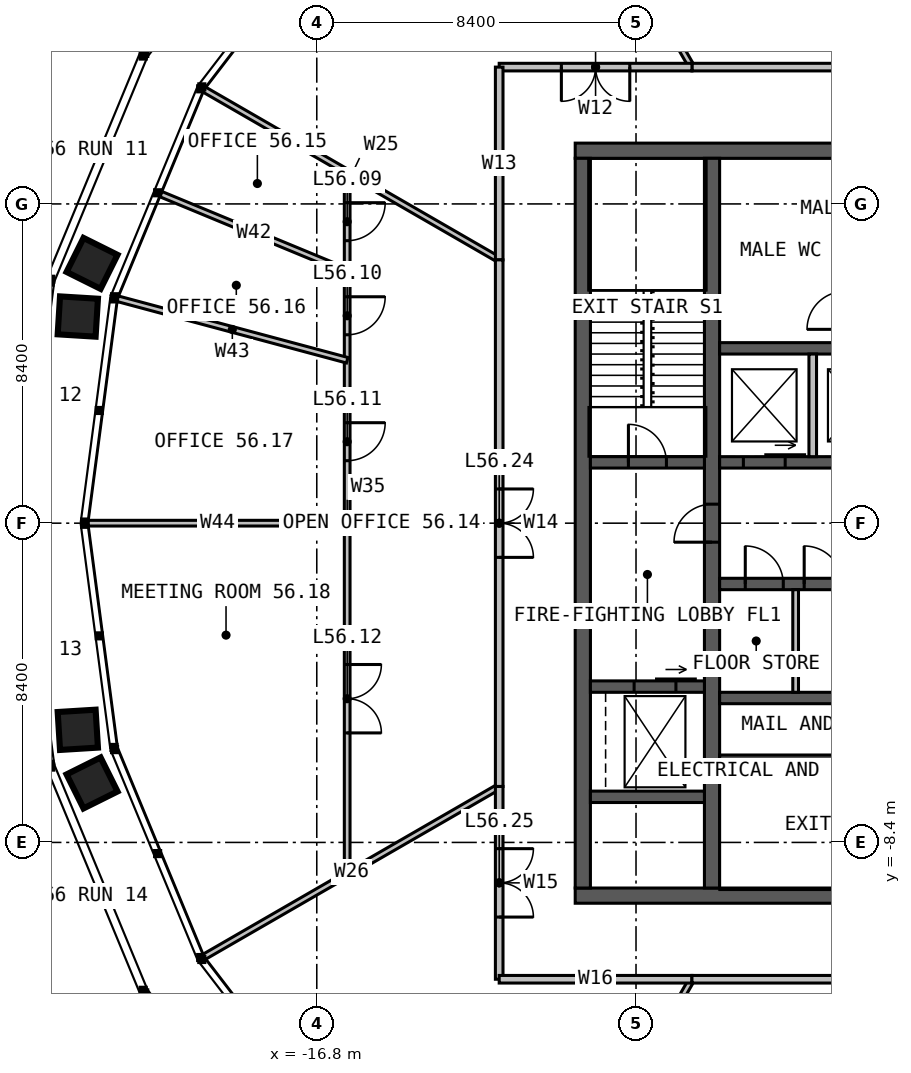
"""IFC4 building model, lengths in metres.
Left out: names, types, materials, properties, quantities, classifications, styles, units other than length and angle.
Written with IfcOpenShell. Run it as: python <this file> out.ifc"""

import sys

from ifc_helpers import new_model, si_unit, direction, frame, frame_2d, origin, place, context, subcontext, project, spatial, rectangle, extrude, element, fill, save


model = new_model("IFC4")
c1 = context("Model", 3, precision=1e-05, world=origin(), true_north=direction((0.0, 1.0)))
c2 = subcontext(c1, "Body", "Model", "MODEL_VIEW")
j1 = project(units=[si_unit("LENGTHUNIT", "METRE"), si_unit("PLANEANGLEUNIT", "RADIAN")], contexts=[c1])
p1 = place(None, origin())
s1 = spatial("IfcSite", under=j1, at=p1, CompositionType="ELEMENT")
p2 = place(p1, origin())
s2 = spatial("IfcBuilding", under=s1, at=p2, CompositionType="ELEMENT")
p3 = place(p2, frame((0.0, 0.0, 232.0)))
s3 = spatial("IfcBuildingStorey", under=s2, at=p3, CompositionType="ELEMENT", Elevation=232.0)
p4 = place(p3, frame((-10.0, 9.8, 0.0), z_axis=(0.0, 0.0, 1.0), x_axis=(1.0, 0.0, 0.0)))
e1 = element("IfcWall", 1, at=p4, inside=s3, PredefinedType="SOLIDWALL", context=c2, shape_type="SweptSolid", body=[
    extrude(rectangle(XDim=20.0, YDim=0.4, at=frame_2d((10.0, 0.0))), origin(), (0.0, 0.0, 1.0), 4.0),
])
p5 = place(p4, frame((9.4, 0.0, 0.0)))
e2 = element("IfcOpeningElement", 2, at=p5, cuts=e1, PredefinedType="OPENING", context=c2, shape_type="SweptSolid", body=[
    extrude(rectangle(XDim=1.2, YDim=2.2, at=frame_2d((0.6, 1.1))), frame((0.0, 0.21, 0.0), z_axis=(0.0, -1.0, 0.0), x_axis=(1.0, 0.0, 0.0)), (0.0, 0.0, 1.0), 0.42),
])
p6 = place(p3, frame((10.0, -9.8, 0.0), z_axis=(0.0, 0.0, 1.0), x_axis=(-1.0, 0.0, 0.0)))
e3 = element("IfcWall", 3, at=p6, inside=s3, PredefinedType="SOLIDWALL", context=c2, shape_type="SweptSolid", body=[
    extrude(rectangle(XDim=20.0, YDim=0.4, at=frame_2d((10.0, 0.0))), origin(), (0.0, 0.0, 1.0), 4.0),
])
p7 = place(p6, frame((6.875, 0.0, 0.0)))
e4 = element("IfcOpeningElement", 4, at=p7, cuts=e3, PredefinedType="OPENING", context=c2, shape_type="SweptSolid", body=[
    extrude(rectangle(XDim=1.2, YDim=2.2, at=frame_2d((0.6, 1.1))), frame((0.0, 0.21, 0.0), z_axis=(0.0, -1.0, 0.0), x_axis=(1.0, 0.0, 0.0)), (0.0, 0.0, 1.0), 0.42),
])
p8 = place(p3, frame((-9.8, 9.6, 0.0), z_axis=(0.0, 0.0, 1.0), x_axis=(0.0, -1.0, 0.0)))
e5 = element("IfcWall", 5, at=p8, inside=s3, PredefinedType="SOLIDWALL", context=c2, shape_type="SweptSolid", body=[
    extrude(rectangle(XDim=19.2, YDim=0.4, at=frame_2d((9.6, 0.0))), origin(), (0.0, 0.0, 1.0), 4.0),
])
p9 = place(p3, frame((-6.4, -9.6, 0.0), z_axis=(0.0, 0.0, 1.0), x_axis=(0.0, 1.0, 0.0)))
e6 = element("IfcWall", 6, at=p9, inside=s3, PredefinedType="SOLIDWALL", context=c2, shape_type="SweptSolid", body=[
    extrude(rectangle(XDim=19.2, YDim=0.4, at=frame_2d((9.6, 0.0))), origin(), (0.0, 0.0, 1.0), 4.0),
])
p10 = place(p9, frame((9.1, 0.0, 0.0)))
e7 = element("IfcOpeningElement", 7, at=p10, cuts=e6, PredefinedType="OPENING", context=c2, shape_type="SweptSolid", body=[
    extrude(rectangle(XDim=1.0, YDim=2.2, at=frame_2d((0.5, 1.1))), frame((0.0, 0.21, 0.0), z_axis=(0.0, -1.0, 0.0), x_axis=(1.0, 0.0, 0.0)), (0.0, 0.0, 1.0), 0.42),
])
p11 = place(p3, frame((-6.2, 1.6, 0.0), z_axis=(0.0, 0.0, 1.0), x_axis=(1.0, 0.0, 0.0)))
e8 = element("IfcWall", 8, at=p11, inside=s3, PredefinedType="SOLIDWALL", context=c2, shape_type="SweptSolid", body=[
    extrude(rectangle(XDim=4.85, YDim=0.3, at=frame_2d((2.425, 0.0))), origin(), (0.0, 0.0, 1.0), 4.0),
])
p12 = place(p11, frame((0.625, 0.0, 0.0)))
e9 = element("IfcOpeningElement", 9, at=p12, cuts=e8, PredefinedType="OPENING", context=c2, shape_type="SweptSolid", body=[
    extrude(rectangle(XDim=1.1, YDim=2.2, at=frame_2d((0.55, 1.1))), frame((0.0, 0.16, 0.0), z_axis=(0.0, -1.0, 0.0), x_axis=(1.0, 0.0, 0.0)), (0.0, 0.0, 1.0), 0.32),
])
p13 = place(p11, frame((3.15, 0.0, 0.0)))
e10 = element("IfcOpeningElement", 10, at=p13, cuts=e8, PredefinedType="OPENING", context=c2, shape_type="SweptSolid", body=[
    extrude(rectangle(XDim=1.1, YDim=2.2, at=frame_2d((0.55, 1.1))), frame((0.0, 0.16, 0.0), z_axis=(0.0, -1.0, 0.0), x_axis=(1.0, 0.0, 0.0)), (0.0, 0.0, 1.0), 0.32),
])
p14 = place(p3, frame((-6.2, 4.6, 0.0), z_axis=(0.0, 0.0, 1.0), x_axis=(1.0, 0.0, 0.0)))
e11 = element("IfcWall", 11, at=p14, inside=s3, PredefinedType="SOLIDWALL", context=c2, shape_type="SweptSolid", body=[
    extrude(rectangle(XDim=4.85, YDim=0.3, at=frame_2d((2.425, 0.0))), origin(), (0.0, 0.0, 1.0), 4.0),
])
p15 = place(p3, frame((-6.2, -1.6, 0.0), z_axis=(0.0, 0.0, 1.0), x_axis=(1.0, 0.0, 0.0)))
e12 = element("IfcWall", 12, at=p15, inside=s3, PredefinedType="SOLIDWALL", context=c2, shape_type="SweptSolid", body=[
    extrude(rectangle(XDim=7.4, YDim=0.3, at=frame_2d((3.7, 0.0))), origin(), (0.0, 0.0, 1.0), 4.0),
])
p16 = place(p15, frame((0.675, 0.0, 0.0)))
e13 = element("IfcOpeningElement", 13, at=p16, cuts=e12, PredefinedType="OPENING", context=c2, shape_type="SweptSolid", body=[
    extrude(rectangle(XDim=1.0, YDim=2.2, at=frame_2d((0.5, 1.1))), frame((0.0, 0.16, 0.0), z_axis=(0.0, -1.0, 0.0), x_axis=(1.0, 0.0, 0.0)), (0.0, 0.0, 1.0), 0.32),
])
p17 = place(p15, frame((2.225, 0.0, 0.0)))
e14 = element("IfcOpeningElement", 14, at=p17, cuts=e12, PredefinedType="OPENING", context=c2, shape_type="SweptSolid", body=[
    extrude(rectangle(XDim=1.0, YDim=2.2, at=frame_2d((0.5, 1.1))), frame((0.0, 0.16, 0.0), z_axis=(0.0, -1.0, 0.0), x_axis=(1.0, 0.0, 0.0)), (0.0, 0.0, 1.0), 0.32),
])
p18 = place(p15, frame((3.695, 0.0, 0.0)))
e15 = element("IfcOpeningElement", 15, at=p18, cuts=e12, PredefinedType="OPENING", context=c2, shape_type="SweptSolid", body=[
    extrude(rectangle(XDim=1.0, YDim=2.2, at=frame_2d((0.5, 1.1))), frame((0.0, 0.16, 0.0), z_axis=(0.0, -1.0, 0.0), x_axis=(1.0, 0.0, 0.0)), (0.0, 0.0, 1.0), 0.32),
])
p19 = place(p3, frame((-6.2, -4.6, 0.0), z_axis=(0.0, 0.0, 1.0), x_axis=(1.0, 0.0, 0.0)))
e16 = element("IfcWall", 16, at=p19, inside=s3, PredefinedType="SOLIDWALL", context=c2, shape_type="SweptSolid", body=[
    extrude(rectangle(XDim=7.4, YDim=0.3, at=frame_2d((3.7, 0.0))), origin(), (0.0, 0.0, 1.0), 4.0),
])
p20 = place(p3, frame((-6.2, -6.2, 0.0), z_axis=(0.0, 0.0, 1.0), x_axis=(1.0, 0.0, 0.0)))
e17 = element("IfcWall", 17, at=p20, inside=s3, PredefinedType="SOLIDWALL", context=c2, shape_type="SweptSolid", body=[
    extrude(rectangle(XDim=7.4, YDim=0.2, at=frame_2d((3.7, 0.0))), origin(), (0.0, 0.0, 1.0), 4.0),
])
p21 = place(p3, frame((-9.6, 1.6, 0.0), z_axis=(0.0, 0.0, 1.0), x_axis=(1.0, 0.0, 0.0)))
e18 = element("IfcWall", 18, at=p21, inside=s3, PredefinedType="SOLIDWALL", context=c2, shape_type="SweptSolid", body=[
    extrude(rectangle(XDim=3.0, YDim=0.3, at=frame_2d((1.5, 0.0))), origin(), (0.0, 0.0, 1.0), 4.0),
])
p22 = place(p21, frame((1.0, 0.0, 0.0)))
e19 = element("IfcOpeningElement", 19, at=p22, cuts=e18, PredefinedType="OPENING", context=c2, shape_type="SweptSolid", body=[
    extrude(rectangle(XDim=1.0, YDim=2.2, at=frame_2d((0.5, 1.1))), frame((0.0, 0.16, 0.0), z_axis=(0.0, -1.0, 0.0), x_axis=(1.0, 0.0, 0.0)), (0.0, 0.0, 1.0), 0.32),
])
p23 = place(p3, frame((-9.6, -4.3, 0.0), z_axis=(0.0, 0.0, 1.0), x_axis=(1.0, 0.0, 0.0)))
e20 = element("IfcWall", 20, at=p23, inside=s3, PredefinedType="SOLIDWALL", context=c2, shape_type="SweptSolid", body=[
    extrude(rectangle(XDim=3.0, YDim=0.3, at=frame_2d((1.5, 0.0))), origin(), (0.0, 0.0, 1.0), 4.0),
])
p24 = place(p23, frame((1.15, 0.0, 0.0)))
e21 = element("IfcOpeningElement", 21, at=p24, cuts=e20, PredefinedType="OPENING", context=c2, shape_type="SweptSolid", body=[
    extrude(rectangle(XDim=1.1, YDim=2.2, at=frame_2d((0.55, 1.1))), frame((0.0, 0.16, 0.0), z_axis=(0.0, -1.0, 0.0), x_axis=(1.0, 0.0, 0.0)), (0.0, 0.0, 1.0), 0.32),
])
p25 = place(p3, frame((-9.6, -7.2, 0.0), z_axis=(0.0, 0.0, 1.0), x_axis=(1.0, 0.0, 0.0)))
e22 = element("IfcWall", 22, at=p25, inside=s3, PredefinedType="SOLIDWALL", context=c2, shape_type="SweptSolid", body=[
    extrude(rectangle(XDim=3.0, YDim=0.3, at=frame_2d((1.5, 0.0))), origin(), (0.0, 0.0, 1.0), 4.0),
])
p26 = place(p3, frame((-3.75, 1.75, 0.0), z_axis=(0.0, 0.0, 1.0), x_axis=(0.0, 1.0, 0.0)))
e23 = element("IfcWall", 23, at=p26, inside=s3, PredefinedType="SOLIDWALL", context=c2, shape_type="SweptSolid", body=[
    extrude(rectangle(XDim=2.7, YDim=0.2, at=frame_2d((1.35, 0.0))), origin(), (0.0, 0.0, 1.0), 3.75),
])
p27 = place(p3, frame((-4.2, -1.75, 0.0), z_axis=(0.0, 0.0, 1.0), x_axis=(0.0, -1.0, 0.0)))
e24 = element("IfcWall", 24, at=p27, inside=s3, PredefinedType="PARTITIONING", context=c2, shape_type="SweptSolid", body=[
    extrude(rectangle(XDim=2.7, YDim=0.15, at=frame_2d((1.35, 0.0))), origin(), (0.0, 0.0, 1.0), 3.75),
])
for number, where, z_axis, x_axis in (
    (25, (-6.928, 12.0, 0.0), (0.0, 0.0, 1.0), (-0.5, 0.866, 0.0)),
    (26, (-12.0, 6.928, 0.0), (0.0, 0.0, 1.0), (-0.866, 0.5, 0.0)),
    (27, (-12.0, -6.928, 0.0), (0.0, 0.0, 1.0), (-0.866, -0.5, 0.0)),
    (28, (-6.928, -12.0, 0.0), (0.0, 0.0, 1.0), (-0.5, -0.866, 0.0)),
):
    element("IfcWall", number, at=place(p3, frame(where, z_axis=z_axis, x_axis=x_axis)), inside=s3, PredefinedType="PARTITIONING", context=c2, shape_type="SweptSolid", body=[
        extrude(rectangle(XDim=8.966, YDim=0.15, at=frame_2d((4.483, 0.0))), origin(), (0.0, 0.0, 1.0), 2.79),
    ])
p28 = place(p3, frame((6.928, 12.0, 0.0), z_axis=(0.0, 0.0, 1.0), x_axis=(-1.0, 0.0, 0.0)))
e29 = element("IfcWall", 29, at=p28, inside=s3, PredefinedType="PARTITIONING", context=c2, shape_type="SweptSolid", body=[
    extrude(rectangle(XDim=13.856, YDim=0.2, at=frame_2d((6.928, 0.0))), origin(), (0.0, 0.0, 1.0), 3.8),
])
p29 = place(p28, frame((6.028, 0.0, 0.0)))
e30 = element("IfcOpeningElement", 30, at=p29, cuts=e29, PredefinedType="OPENING", context=c2, shape_type="SweptSolid", body=[
    extrude(rectangle(XDim=1.8, YDim=2.2, at=frame_2d((0.9, 1.1))), frame((0.0, 0.11, 0.0), z_axis=(0.0, -1.0, 0.0), x_axis=(1.0, 0.0, 0.0)), (0.0, 0.0, 1.0), 0.22),
])
p30 = place(p3, frame((-6.928, 12.0, 0.0), z_axis=(0.0, 0.0, 1.0), x_axis=(-1.0, 0.0, 0.0)))
e31 = element("IfcWall", 31, at=p30, inside=s3, PredefinedType="PARTITIONING", context=c2, shape_type="SweptSolid", body=[
    extrude(rectangle(XDim=5.072, YDim=0.2, at=frame_2d((2.536, 0.0))), origin(), (0.0, 0.0, 1.0), 3.8),
])
p31 = place(p30, frame((1.636, 0.0, 0.0)))
e32 = element("IfcOpeningElement", 32, at=p31, cuts=e31, PredefinedType="OPENING", context=c2, shape_type="SweptSolid", body=[
    extrude(rectangle(XDim=1.8, YDim=2.2, at=frame_2d((0.9, 1.1))), frame((0.0, 0.11, 0.0), z_axis=(0.0, -1.0, 0.0), x_axis=(1.0, 0.0, 0.0)), (0.0, 0.0, 1.0), 0.22),
])
p32 = place(p3, frame((-12.0, 12.0, 0.0), z_axis=(0.0, 0.0, 1.0), x_axis=(0.0, -1.0, 0.0)))
e33 = element("IfcWall", 33, at=p32, inside=s3, PredefinedType="PARTITIONING", context=c2, shape_type="SweptSolid", body=[
    extrude(rectangle(XDim=5.072, YDim=0.2, at=frame_2d((2.536, 0.0))), origin(), (0.0, 0.0, 1.0), 3.8),
])
p33 = place(p3, frame((-16.0, 9.238, 0.0), z_axis=(0.0, 0.0, 1.0), x_axis=(0.0, -1.0, 0.0)))
e34 = element("IfcWall", 34, at=p33, inside=s3, PredefinedType="PARTITIONING", context=c2, shape_type="SweptSolid", body=[
    extrude(rectangle(XDim=18.475, YDim=0.15, at=frame_2d((9.238, 0.0))), origin(), (0.0, 0.0, 1.0), 2.79),
])
p34 = place(p33, frame((0.805, 0.0, 0.0)))
e35 = element("IfcOpeningElement", 35, at=p34, cuts=e34, PredefinedType="OPENING", context=c2, shape_type="SweptSolid", body=[
    extrude(rectangle(XDim=1.0, YDim=2.2, at=frame_2d((0.5, 1.1))), frame((0.0, 0.085, 0.0), z_axis=(0.0, -1.0, 0.0), x_axis=(1.0, 0.0, 0.0)), (0.0, 0.0, 1.0), 0.17),
])
p35 = place(p33, frame((3.28, 0.0, 0.0)))
e36 = element("IfcOpeningElement", 36, at=p35, cuts=e34, PredefinedType="OPENING", context=c2, shape_type="SweptSolid", body=[
    extrude(rectangle(XDim=1.0, YDim=2.2, at=frame_2d((0.5, 1.1))), frame((0.0, 0.085, 0.0), z_axis=(0.0, -1.0, 0.0), x_axis=(1.0, 0.0, 0.0)), (0.0, 0.0, 1.0), 0.17),
])
p36 = place(p33, frame((6.594, 0.0, 0.0)))
e37 = element("IfcOpeningElement", 37, at=p36, cuts=e34, PredefinedType="OPENING", context=c2, shape_type="SweptSolid", body=[
    extrude(rectangle(XDim=1.0, YDim=2.2, at=frame_2d((0.5, 1.1))), frame((0.0, 0.085, 0.0), z_axis=(0.0, -1.0, 0.0), x_axis=(1.0, 0.0, 0.0)), (0.0, 0.0, 1.0), 0.17),
])
p37 = place(p33, frame((12.956, 0.0, 0.0)))
e38 = element("IfcOpeningElement", 38, at=p37, cuts=e34, PredefinedType="OPENING", context=c2, shape_type="SweptSolid", body=[
    extrude(rectangle(XDim=1.8, YDim=2.2, at=frame_2d((0.9, 1.1))), frame((0.0, 0.085, 0.0), z_axis=(0.0, -1.0, 0.0), x_axis=(1.0, 0.0, 0.0)), (0.0, 0.0, 1.0), 0.17),
])
p38 = place(p3, frame((-16.0, 6.627, 0.0), z_axis=(0.0, 0.0, 1.0), x_axis=(-0.923881747956, 0.382678083764, 0.0)))
e39 = element("IfcWall", 39, at=p38, inside=s3, PredefinedType="PARTITIONING", context=c2, shape_type="SweptSolid", body=[
    extrude(rectangle(XDim=5.309, YDim=0.15, at=frame_2d((2.654, 0.0))), origin(), (0.0, 0.0, 1.0), 2.79),
])
p39 = place(p3, frame((-16.0, 4.287, 0.0), z_axis=(0.0, 0.0, 1.0), x_axis=(-0.965927328821, 0.258813437513, 0.0)))
e40 = element("IfcWall", 40, at=p39, inside=s3, PredefinedType="PARTITIONING", context=c2, shape_type="SweptSolid", body=[
    extrude(rectangle(XDim=6.258, YDim=0.15, at=frame_2d((3.129, 0.0))), origin(), (0.0, 0.0, 1.0), 2.79),
])
p40 = place(p3, frame((-16.0, 0.0, 0.0), z_axis=(0.0, 0.0, 1.0), x_axis=(-1.0, 0.0, 0.0)))
e41 = element("IfcWall", 41, at=p40, inside=s3, PredefinedType="PARTITIONING", context=c2, shape_type="SweptSolid", body=[
    extrude(rectangle(XDim=6.822, YDim=0.15, at=frame_2d((3.411, 0.0))), origin(), (0.0, 0.0, 1.0), 2.79),
])
p41 = place(p3, frame((-12.0, 6.928, 0.0), z_axis=(0.0, 0.0, 1.0), x_axis=(0.0, -1.0, 0.0)))
e42 = element("IfcWall", 42, at=p41, inside=s3, PredefinedType="PARTITIONING", context=c2, shape_type="SweptSolid", body=[
    extrude(rectangle(XDim=13.856, YDim=0.2, at=frame_2d((6.928, 0.0))), origin(), (0.0, 0.0, 1.0), 3.8),
])
p42 = place(p41, frame((6.028, 0.0, 0.0)))
e43 = element("IfcOpeningElement", 43, at=p42, cuts=e42, PredefinedType="OPENING", context=c2, shape_type="SweptSolid", body=[
    extrude(rectangle(XDim=1.8, YDim=2.2, at=frame_2d((0.9, 1.1))), frame((0.0, 0.11, 0.0), z_axis=(0.0, -1.0, 0.0), x_axis=(1.0, 0.0, 0.0)), (0.0, 0.0, 1.0), 0.22),
])
p43 = place(p3, frame((-12.0, -6.928, 0.0), z_axis=(0.0, 0.0, 1.0), x_axis=(0.0, -1.0, 0.0)))
e44 = element("IfcWall", 44, at=p43, inside=s3, PredefinedType="PARTITIONING", context=c2, shape_type="SweptSolid", body=[
    extrude(rectangle(XDim=5.072, YDim=0.2, at=frame_2d((2.536, 0.0))), origin(), (0.0, 0.0, 1.0), 3.8),
])
p44 = place(p43, frame((1.636, 0.0, 0.0)))
e45 = element("IfcOpeningElement", 45, at=p44, cuts=e44, PredefinedType="OPENING", context=c2, shape_type="SweptSolid", body=[
    extrude(rectangle(XDim=1.8, YDim=2.2, at=frame_2d((0.9, 1.1))), frame((0.0, 0.11, 0.0), z_axis=(0.0, -1.0, 0.0), x_axis=(1.0, 0.0, 0.0)), (0.0, 0.0, 1.0), 0.22),
])
p45 = place(p3, frame((-12.0, -12.0, 0.0), z_axis=(0.0, 0.0, 1.0), x_axis=(1.0, 0.0, 0.0)))
e46 = element("IfcWall", 46, at=p45, inside=s3, PredefinedType="PARTITIONING", context=c2, shape_type="SweptSolid", body=[
    extrude(rectangle(XDim=5.072, YDim=0.2, at=frame_2d((2.536, 0.0))), origin(), (0.0, 0.0, 1.0), 3.8),
])
p46 = place(p3, frame((-6.928, -12.0, 0.0), z_axis=(0.0, 0.0, 1.0), x_axis=(1.0, 0.0, 0.0)))
e47 = element("IfcWall", 47, at=p46, inside=s3, PredefinedType="PARTITIONING", context=c2, shape_type="SweptSolid", body=[
    extrude(rectangle(XDim=13.856, YDim=0.2, at=frame_2d((6.928, 0.0))), origin(), (0.0, 0.0, 1.0), 3.8),
])
p47 = place(p46, frame((6.028, 0.0, 0.0)))
e48 = element("IfcOpeningElement", 48, at=p47, cuts=e47, PredefinedType="OPENING", context=c2, shape_type="SweptSolid", body=[
    extrude(rectangle(XDim=1.8, YDim=2.2, at=frame_2d((0.9, 1.1))), frame((0.0, 0.11, 0.0), z_axis=(0.0, -1.0, 0.0), x_axis=(1.0, 0.0, 0.0)), (0.0, 0.0, 1.0), 0.22),
])
p48 = place(p10, origin())
e49 = element("IfcDoor", 49, at=p48, inside=s3, OperationType="SINGLE_SWING_LEFT", PredefinedType="DOOR", context=c2, shape_type="SweptSolid", body=[
    extrude(rectangle(XDim=1.0, YDim=2.2, at=frame_2d((0.5, 1.1))), frame((0.0, 0.025, 0.0), z_axis=(0.0, -1.0, 0.0), x_axis=(1.0, 0.0, 0.0)), (0.0, 0.0, 1.0), 0.05),
])
fill(e7, e49)
p49 = place(p22, origin())
e50 = element("IfcDoor", 50, at=p49, inside=s3, OperationType="SINGLE_SWING_LEFT", PredefinedType="DOOR", context=c2, shape_type="SweptSolid", body=[
    extrude(rectangle(XDim=1.0, YDim=2.2, at=frame_2d((0.5, 1.1))), frame((0.0, 0.025, 0.0), z_axis=(0.0, -1.0, 0.0), x_axis=(1.0, 0.0, 0.0)), (0.0, 0.0, 1.0), 0.05),
])
fill(e19, e50)
p50 = place(p16, origin())
e51 = element("IfcDoor", 51, at=p50, inside=s3, OperationType="SINGLE_SWING_LEFT", PredefinedType="DOOR", context=c2, shape_type="SweptSolid", body=[
    extrude(rectangle(XDim=1.0, YDim=2.2, at=frame_2d((0.5, 1.1))), frame((0.0, 0.025, 0.0), z_axis=(0.0, -1.0, 0.0), x_axis=(1.0, 0.0, 0.0)), (0.0, 0.0, 1.0), 0.05),
])
fill(e13, e51)
p51 = place(p17, origin())
e52 = element("IfcDoor", 52, at=p51, inside=s3, OperationType="SINGLE_SWING_LEFT", PredefinedType="DOOR", context=c2, shape_type="SweptSolid", body=[
    extrude(rectangle(XDim=1.0, YDim=2.2, at=frame_2d((0.5, 1.1))), frame((0.0, 0.025, 0.0), z_axis=(0.0, -1.0, 0.0), x_axis=(1.0, 0.0, 0.0)), (0.0, 0.0, 1.0), 0.05),
])
fill(e14, e52)
p52 = place(p12, origin())
e53 = element("IfcDoor", 53, at=p52, inside=s3, OperationType="SLIDING_TO_LEFT", PredefinedType="DOOR", context=c2, shape_type="SweptSolid", body=[
    extrude(rectangle(XDim=1.1, YDim=2.2, at=frame_2d((0.55, 1.1))), frame((0.0, 0.025, 0.0), z_axis=(0.0, -1.0, 0.0), x_axis=(1.0, 0.0, 0.0)), (0.0, 0.0, 1.0), 0.05),
])
fill(e9, e53)
p53 = place(p24, origin())
e54 = element("IfcDoor", 54, at=p53, inside=s3, OperationType="SLIDING_TO_LEFT", PredefinedType="DOOR", context=c2, shape_type="SweptSolid", body=[
    extrude(rectangle(XDim=1.1, YDim=2.2, at=frame_2d((0.55, 1.1))), frame((0.0, 0.025, 0.0), z_axis=(0.0, -1.0, 0.0), x_axis=(1.0, 0.0, 0.0)), (0.0, 0.0, 1.0), 0.05),
])
fill(e21, e54)
p54 = place(p31, origin())
e55 = element("IfcDoor", 55, at=p54, inside=s3, OperationType="DOUBLE_DOOR_SINGLE_SWING", PredefinedType="DOOR", context=c2, shape_type="SweptSolid", body=[
    extrude(rectangle(XDim=1.8, YDim=2.2, at=frame_2d((0.9, 1.1))), frame((0.0, 0.025, 0.0), z_axis=(0.0, -1.0, 0.0), x_axis=(1.0, 0.0, 0.0)), (0.0, 0.0, 1.0), 0.05),
])
fill(e32, e55)
p55 = place(p34, origin())
e56 = element("IfcDoor", 56, at=p55, inside=s3, OperationType="SINGLE_SWING_LEFT", PredefinedType="DOOR", context=c2, shape_type="SweptSolid", body=[
    extrude(rectangle(XDim=1.0, YDim=2.2, at=frame_2d((0.5, 1.1))), frame((0.0, 0.025, 0.0), z_axis=(0.0, -1.0, 0.0), x_axis=(1.0, 0.0, 0.0)), (0.0, 0.0, 1.0), 0.05),
])
fill(e35, e56)
p56 = place(p35, origin())
e57 = element("IfcDoor", 57, at=p56, inside=s3, OperationType="SINGLE_SWING_LEFT", PredefinedType="DOOR", context=c2, shape_type="SweptSolid", body=[
    extrude(rectangle(XDim=1.0, YDim=2.2, at=frame_2d((0.5, 1.1))), frame((0.0, 0.025, 0.0), z_axis=(0.0, -1.0, 0.0), x_axis=(1.0, 0.0, 0.0)), (0.0, 0.0, 1.0), 0.05),
])
fill(e36, e57)
p57 = place(p36, origin())
e58 = element("IfcDoor", 58, at=p57, inside=s3, OperationType="SINGLE_SWING_LEFT", PredefinedType="DOOR", context=c2, shape_type="SweptSolid", body=[
    extrude(rectangle(XDim=1.0, YDim=2.2, at=frame_2d((0.5, 1.1))), frame((0.0, 0.025, 0.0), z_axis=(0.0, -1.0, 0.0), x_axis=(1.0, 0.0, 0.0)), (0.0, 0.0, 1.0), 0.05),
])
fill(e37, e58)
p58 = place(p37, origin())
e59 = element("IfcDoor", 59, at=p58, inside=s3, OperationType="DOUBLE_DOOR_SINGLE_SWING", PredefinedType="DOOR", context=c2, shape_type="SweptSolid", body=[
    extrude(rectangle(XDim=1.8, YDim=2.2, at=frame_2d((0.9, 1.1))), frame((0.0, 0.025, 0.0), z_axis=(0.0, -1.0, 0.0), x_axis=(1.0, 0.0, 0.0)), (0.0, 0.0, 1.0), 0.05),
])
fill(e38, e59)
p59 = place(p42, origin())
e60 = element("IfcDoor", 60, at=p59, inside=s3, OperationType="DOUBLE_DOOR_SINGLE_SWING", PredefinedType="DOOR", context=c2, shape_type="SweptSolid", body=[
    extrude(rectangle(XDim=1.8, YDim=2.2, at=frame_2d((0.9, 1.1))), frame((0.0, 0.025, 0.0), z_axis=(0.0, -1.0, 0.0), x_axis=(1.0, 0.0, 0.0)), (0.0, 0.0, 1.0), 0.05),
])
fill(e43, e60)
p60 = place(p44, origin())
e61 = element("IfcDoor", 61, at=p60, inside=s3, OperationType="DOUBLE_DOOR_SINGLE_SWING", PredefinedType="DOOR", context=c2, shape_type="SweptSolid", body=[
    extrude(rectangle(XDim=1.8, YDim=2.2, at=frame_2d((0.9, 1.1))), frame((0.0, 0.025, 0.0), z_axis=(0.0, -1.0, 0.0), x_axis=(1.0, 0.0, 0.0)), (0.0, 0.0, 1.0), 0.05),
])
fill(e45, e61)
save(model, sys.argv[1])
